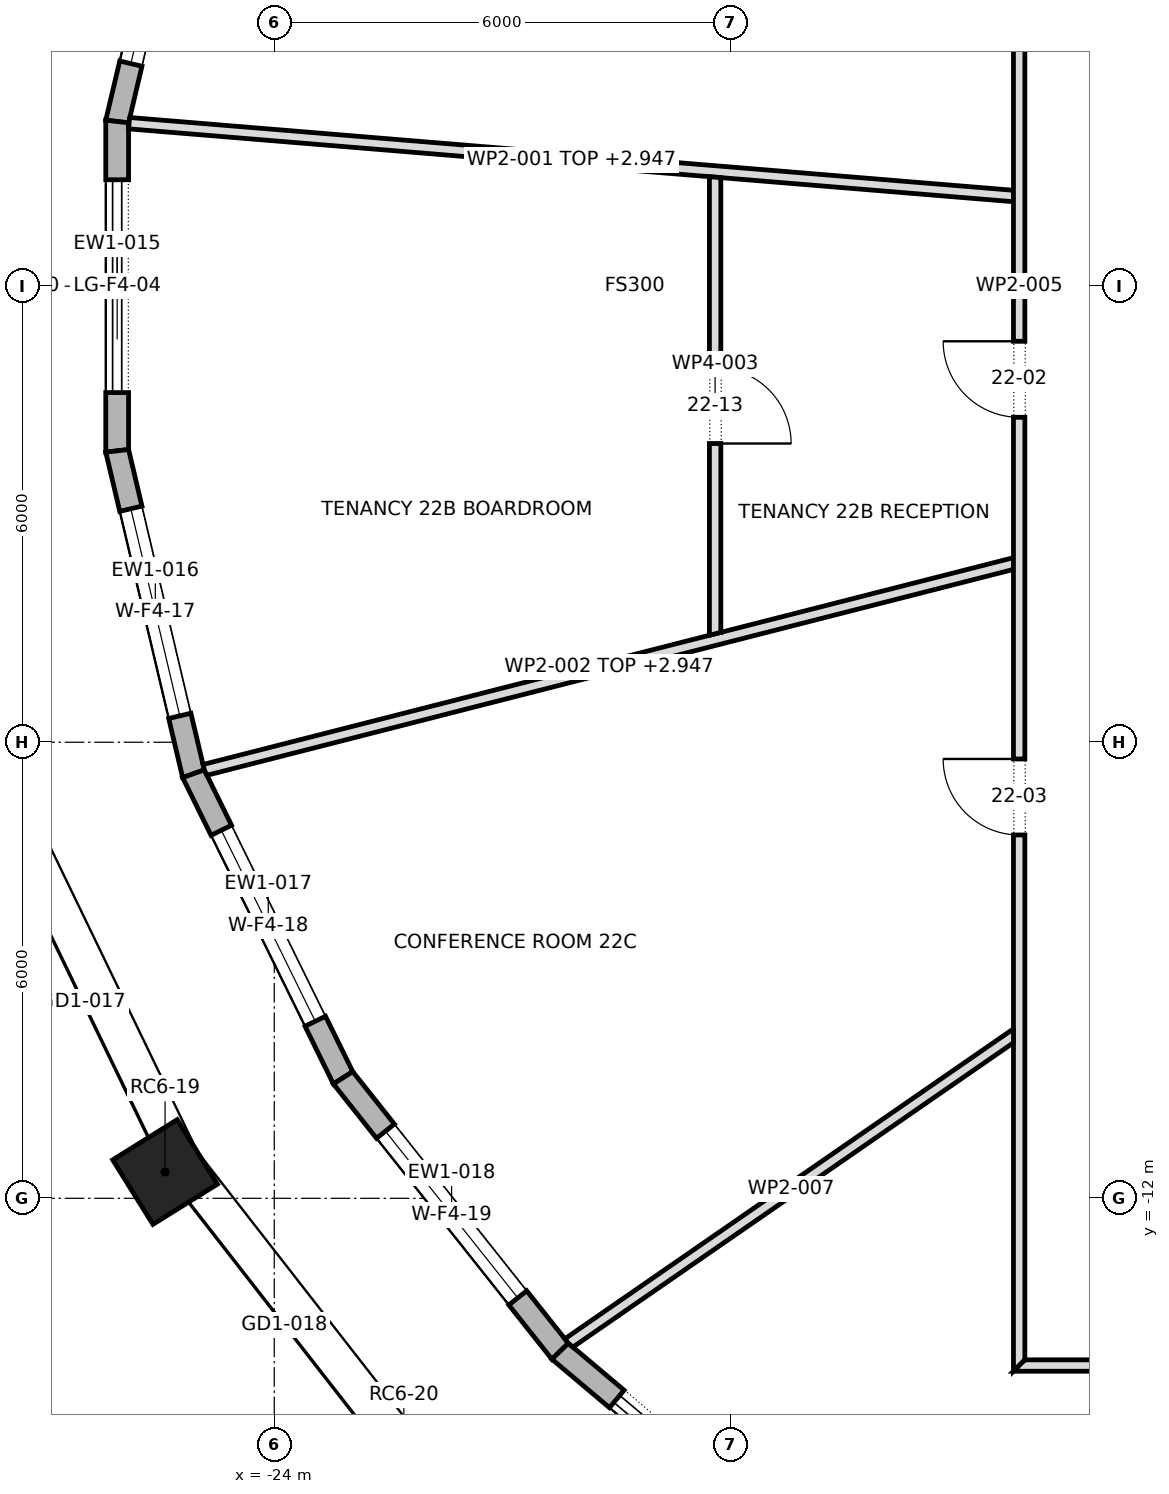
"""IFC4 building model, lengths in metres.
Left out: names, types, materials, properties, quantities, classifications, styles, units other than length and angle.
Written with IfcOpenShell. Run it as: python <this file> out.ifc"""

import sys

from ifc_helpers import new_model, si_unit, direction, frame, frame_2d, origin, origin_2d, place, context, subcontext, project, spatial, polyline, rectangle, outline, extrude, element, fill, save


model = new_model("IFC4")
c1 = context("Model", 3, precision=1e-05, world=origin(), true_north=direction((0.0, 1.0)))
c2 = subcontext(c1, "Body", "Model", "MODEL_VIEW")
j1 = project(units=[si_unit("LENGTHUNIT", "METRE"), si_unit("PLANEANGLEUNIT", "RADIAN")], contexts=[c1])
p1 = place(None, origin())
s1 = spatial("IfcSite", under=j1, at=p1, CompositionType="ELEMENT")
p2 = place(p1, origin())
s2 = spatial("IfcBuilding", under=s1, at=p2, CompositionType="ELEMENT")
p3 = place(p2, frame((0.0, 0.0, 304.3)))
s3 = spatial("IfcBuildingStorey", under=s2, at=p3, CompositionType="ELEMENT", Elevation=304.3)
p4 = place(p3, frame((-25.437, -11.654, 0.0), z_axis=(0.0, 0.0, 1.0), x_axis=(0.529150863019, -0.848527762755, 0.0)))
e1 = element("IfcColumn", 1, at=p4, inside=s3, PredefinedType="COLUMN", context=c2, shape_type="SweptSolid", body=[
    extrude(rectangle(XDim=1.0, YDim=1.0, at=origin_2d()), origin(), (0.0, 0.0, 1.0), 4.0),
])
p5 = place(p3, frame((-25.063, 6.415, 0.0), z_axis=(0.0, 0.0, 1.0), x_axis=(-0.229974411334, -0.973196675977, 0.0)))
e2 = element("IfcWall", 2, at=p5, inside=s3, PredefinedType="STANDARD", context=c2, shape_type="SweptSolid", body=[
    extrude(outline(polyline([(-0.017, -0.15), (4.383, -0.15), (4.348, 0.15), (0.017, 0.15), (-0.017, -0.15)])), origin(), (0.0, 0.0, 1.0), 3.7),
])
p6 = place(p5, frame((0.783, 0.0, 0.6)))
e3 = element("IfcOpeningElement", 3, at=p6, cuts=e2, PredefinedType="OPENING", context=c2, shape_type="SweptSolid", body=[
    extrude(rectangle(XDim=2.8, YDim=2.65, at=frame_2d((1.4, 1.325))), frame((0.0, 0.162, 0.0), z_axis=(0.0, -1.0, 0.0), x_axis=(1.0, 0.0, 0.0)), (0.0, 0.0, 1.0), 0.324),
])
p7 = place(p3, frame((-26.067, 2.166, 0.0), z_axis=(0.0, 0.0, 1.0), x_axis=(0.0, -1.0, 0.0)))
e4 = element("IfcWall", 4, at=p7, inside=s3, PredefinedType="STANDARD", context=c2, shape_type="SweptSolid", body=[
    extrude(outline(polyline([(-0.018, -0.15), (4.35, -0.15), (4.315, 0.15), (0.018, 0.15), (-0.018, -0.15)])), origin(), (0.0, 0.0, 1.0), 3.7),
])
p8 = place(p7, frame((0.766, 0.0, 0.0)))
e5 = element("IfcOpeningElement", 5, at=p8, cuts=e4, PredefinedType="OPENING", context=c2, shape_type="SweptSolid", body=[
    extrude(rectangle(XDim=2.8, YDim=3.25, at=frame_2d((1.4, 1.625))), frame((0.0, 0.162, 0.0), z_axis=(0.0, -1.0, 0.0), x_axis=(1.0, 0.0, 0.0)), (0.0, 0.0, 1.0), 0.324),
])
p9 = place(p3, frame((-26.067, -2.166, 0.0), z_axis=(0.0, 0.0, 1.0), x_axis=(0.229974411334, -0.973196675977, 0.0)))
e6 = element("IfcWall", 6, at=p9, inside=s3, PredefinedType="STANDARD", context=c2, shape_type="SweptSolid", body=[
    extrude(outline(polyline([(-0.018, -0.15), (4.382, -0.15), (4.348, 0.15), (0.018, 0.15), (-0.018, -0.15)])), origin(), (0.0, 0.0, 1.0), 3.7),
])
p10 = place(p9, frame((0.783, 0.0, 0.6)))
e7 = element("IfcOpeningElement", 7, at=p10, cuts=e6, PredefinedType="OPENING", context=c2, shape_type="SweptSolid", body=[
    extrude(rectangle(XDim=2.8, YDim=2.65, at=frame_2d((1.4, 1.325))), frame((0.0, 0.162, 0.0), z_axis=(0.0, -1.0, 0.0), x_axis=(1.0, 0.0, 0.0)), (0.0, 0.0, 1.0), 0.324),
])
p11 = place(p3, frame((-25.063, -6.415, 0.0), z_axis=(0.0, 0.0, 1.0), x_axis=(0.441509050872, -0.897256796017, 0.0)))
e8 = element("IfcWall", 8, at=p11, inside=s3, PredefinedType="STANDARD", context=c2, shape_type="SweptSolid", body=[
    extrude(outline(polyline([(-0.017, -0.15), (4.474, -0.15), (4.442, 0.15), (0.017, 0.15), (-0.017, -0.15)])), origin(), (0.0, 0.0, 1.0), 3.7),
])
p12 = place(p11, frame((0.829, 0.0, 0.6)))
e9 = element("IfcOpeningElement", 9, at=p12, cuts=e8, PredefinedType="OPENING", context=c2, shape_type="SweptSolid", body=[
    extrude(rectangle(XDim=2.8, YDim=2.65, at=frame_2d((1.4, 1.325))), frame((0.0, 0.162, 0.0), z_axis=(0.0, -1.0, 0.0), x_axis=(1.0, 0.0, 0.0)), (0.0, 0.0, 1.0), 0.324),
])
p13 = place(p3, frame((-23.094, -10.415, 0.0), z_axis=(0.0, 0.0, 1.0), x_axis=(0.621682706372, -0.78326918272, 0.0)))
e10 = element("IfcWall", 10, at=p13, inside=s3, PredefinedType="STANDARD", context=c2, shape_type="SweptSolid", body=[
    extrude(outline(polyline([(-0.016, -0.15), (4.608, -0.15), (4.578, 0.15), (0.016, 0.15), (-0.016, -0.15)])), origin(), (0.0, 0.0, 1.0), 3.7),
])
p14 = place(p13, frame((0.896, 0.0, 0.6)))
e11 = element("IfcOpeningElement", 11, at=p14, cuts=e10, PredefinedType="OPENING", context=c2, shape_type="SweptSolid", body=[
    extrude(rectangle(XDim=2.8, YDim=2.65, at=frame_2d((1.4, 1.325))), frame((0.0, 0.162, 0.0), z_axis=(0.0, -1.0, 0.0), x_axis=(1.0, 0.0, 0.0)), (0.0, 0.0, 1.0), 0.324),
])
p15 = place(p3, frame((-20.239, -14.012, 0.0), z_axis=(0.0, 0.0, 1.0), x_axis=(0.765059193792, -0.643959959931, 0.0)))
e12 = element("IfcWall", 12, at=p15, inside=s3, PredefinedType="STANDARD", context=c2, shape_type="SweptSolid", body=[
    extrude(outline(polyline([(-0.015, -0.15), (4.762, -0.15), (4.734, 0.15), (0.015, 0.15), (-0.015, -0.15)])), origin(), (0.0, 0.0, 1.0), 3.7),
])
p16 = place(p15, frame((0.974, 0.0, 0.0)))
e13 = element("IfcOpeningElement", 13, at=p16, cuts=e12, PredefinedType="OPENING", context=c2, shape_type="SweptSolid", body=[
    extrude(rectangle(XDim=2.8, YDim=3.25, at=frame_2d((1.4, 1.625))), frame((0.0, 0.162, 0.0), z_axis=(0.0, -1.0, 0.0), x_axis=(1.0, 0.0, 0.0)), (0.0, 0.0, 1.0), 0.324),
])
p17 = place(p3, frame((-25.91, 2.145, 0.0), z_axis=(0.0, 0.0, 1.0), x_axis=(0.996625584757, -0.082081933503, 0.0)))
e14 = element("IfcWall", 14, at=p17, inside=s3, PredefinedType="PARTITIONING", context=c2, shape_type="SweptSolid", body=[
    extrude(outline(polyline([(11.68, -0.075), (11.68, -0.068), (11.668, 0.075), (9.724, 0.075), (7.78, 0.075), (5.836, 0.075), (3.892, 0.075), (1.948, 0.075), (0.004, 0.075), (0.0, 0.049), (0.0, -0.075), (1.947, -0.075), (3.893, -0.075), (5.84, -0.075), (7.787, -0.075), (9.733, -0.075), (11.68, -0.075)])), origin(), (0.0, 0.0, 1.0), 2.947),
])
p18 = place(p3, frame((-24.919, -6.365, 0.0), z_axis=(0.0, 0.0, 1.0), x_axis=(0.968945878768, 0.247272893819, 0.0)))
e15 = element("IfcWall", 15, at=p18, inside=s3, PredefinedType="PARTITIONING", context=c2, shape_type="SweptSolid", body=[
    extrude(outline(polyline([(0.015, -0.075), (1.84, -0.075), (3.665, -0.075), (5.49, -0.075), (7.315, -0.075), (9.141, -0.075), (10.966, -0.075), (11.004, 0.075), (11.004, 0.075), (9.017, 0.075), (7.031, 0.075), (7.031, 0.074), (7.028, 0.075), (5.271, 0.075), (3.514, 0.075), (1.757, 0.075), (0.0, 0.075), (0.0, -0.005), (0.015, -0.075)])), origin(), (0.0, 0.0, 1.0), 2.947),
])
p19 = place(p3, frame((-18.2, -4.593, 0.0), z_axis=(0.0, 0.0, 1.0), x_axis=(0.0, 1.0, 0.0)))
e16 = element("IfcWall", 16, at=p19, inside=s3, PredefinedType="PARTITIONING", context=c2, shape_type="SweptSolid", body=[
    extrude(outline(polyline([(0.038, -0.075), (2.032, -0.075), (4.026, -0.075), (6.021, -0.075), (6.032, 0.07), (6.032, 0.075), (4.524, 0.075), (3.016, 0.075), (1.508, 0.075), (0.0, 0.075), (0.0, 0.075), (0.038, -0.075)])), origin(), (0.0, 0.0, 1.0), 3.7),
])
p20 = place(p19, frame((2.522, 0.0, 0.0)))
e17 = element("IfcOpeningElement", 17, at=p20, cuts=e16, PredefinedType="OPENING", context=c2, shape_type="SweptSolid", body=[
    extrude(rectangle(XDim=1.0, YDim=2.1, at=frame_2d((0.5, 1.05))), frame((0.0, 0.087, 0.0), z_axis=(0.0, -1.0, 0.0), x_axis=(1.0, 0.0, 0.0)), (0.0, 0.0, 1.0), 0.174),
])
p21 = place(p3, frame((-14.2, -14.275, 0.0), z_axis=(0.0, 0.0, 1.0), x_axis=(0.0, 1.0, 0.0)))
e18 = element("IfcWall", 18, at=p21, inside=s3, PredefinedType="PARTITIONING", context=c2, shape_type="SweptSolid", body=[
    extrude(outline(polyline([(0.15, -0.075), (2.033, -0.075), (3.917, -0.075), (5.8, -0.075), (7.683, -0.075), (9.567, -0.075), (11.45, -0.075), (13.333, -0.075), (15.217, -0.075), (17.1, -0.075), (18.983, -0.075), (20.866, -0.075), (22.75, -0.075), (24.633, -0.075), (26.517, -0.075), (28.4, -0.075), (28.55, 0.075), (28.55, 0.075), (26.646, 0.075), (24.743, 0.075), (22.84, 0.075), (20.937, 0.075), (19.033, 0.075), (17.13, 0.075), (15.227, 0.075), (13.323, 0.075), (11.42, 0.075), (9.517, 0.075), (7.613, 0.075), (5.71, 0.075), (3.807, 0.075), (1.903, 0.075), (0.0, 0.075), (0.15, -0.075)])), origin(), (0.0, 0.0, 1.0), 3.7),
])
p22 = place(p21, frame((21.465, 0.0, 0.0)))
e19 = element("IfcOpeningElement", 19, at=p22, cuts=e18, PredefinedType="OPENING", context=c2, shape_type="SweptSolid", body=[
    extrude(rectangle(XDim=1.0, YDim=2.1, at=frame_2d((0.5, 1.05))), frame((0.0, 0.087, 0.0), z_axis=(0.0, -1.0, 0.0), x_axis=(1.0, 0.0, 0.0)), (0.0, 0.0, 1.0), 0.174),
])
p23 = place(p21, frame((12.55, 0.0, 0.0)))
e20 = element("IfcOpeningElement", 20, at=p23, cuts=e18, PredefinedType="OPENING", context=c2, shape_type="SweptSolid", body=[
    extrude(rectangle(XDim=1.0, YDim=2.1, at=frame_2d((0.5, 1.05))), frame((0.0, 0.087, 0.0), z_axis=(0.0, -1.0, 0.0), x_axis=(1.0, 0.0, 0.0)), (0.0, 0.0, 1.0), 0.174),
])
p24 = place(p21, frame((7.055, 0.0, 0.0)))
e21 = element("IfcOpeningElement", 21, at=p24, cuts=e18, PredefinedType="OPENING", context=c2, shape_type="SweptSolid", body=[
    extrude(rectangle(XDim=1.0, YDim=2.1, at=frame_2d((0.5, 1.05))), frame((0.0, 0.087, 0.0), z_axis=(0.0, -1.0, 0.0), x_axis=(1.0, 0.0, 0.0)), (0.0, 0.0, 1.0), 0.174),
])
p25 = place(p3, frame((-14.275, -14.2, 0.0), z_axis=(0.0, 0.0, 1.0), x_axis=(1.0, 0.0, 0.0)))
e22 = element("IfcWall", 22, at=p25, inside=s3, PredefinedType="PARTITIONING", context=c2, shape_type="SweptSolid", body=[
    extrude(outline(polyline([(28.55, -0.075), (28.55, -0.075), (28.4, 0.075), (26.517, 0.075), (24.633, 0.075), (22.75, 0.075), (20.866, 0.075), (18.983, 0.075), (17.1, 0.075), (15.217, 0.075), (13.333, 0.075), (11.45, 0.075), (9.567, 0.075), (7.683, 0.075), (5.8, 0.075), (3.917, 0.075), (2.033, 0.075), (0.15, 0.075), (0.0, -0.075), (1.903, -0.075), (3.807, -0.075), (5.71, -0.075), (7.613, -0.075), (9.517, -0.075), (11.42, -0.075), (13.323, -0.075), (15.227, -0.075), (17.13, -0.075), (19.033, -0.075), (20.937, -0.075), (22.84, -0.075), (24.743, -0.075), (26.646, -0.075), (28.55, -0.075)])), origin(), (0.0, 0.0, 1.0), 3.7),
])
p26 = place(p25, frame((2.165, 0.0, 0.0)))
e23 = element("IfcOpeningElement", 23, at=p26, cuts=e22, PredefinedType="OPENING", context=c2, shape_type="SweptSolid", body=[
    extrude(rectangle(XDim=1.0, YDim=2.1, at=frame_2d((0.5, 1.05))), frame((0.0, 0.087, 0.0), z_axis=(0.0, -1.0, 0.0), x_axis=(1.0, 0.0, 0.0)), (0.0, 0.0, 1.0), 0.174),
])
p27 = place(p25, frame((11.825, 0.0, 0.0)))
e24 = element("IfcOpeningElement", 24, at=p27, cuts=e22, PredefinedType="OPENING", context=c2, shape_type="SweptSolid", body=[
    extrude(rectangle(XDim=1.0, YDim=2.1, at=frame_2d((0.5, 1.05))), frame((0.0, 0.087, 0.0), z_axis=(0.0, -1.0, 0.0), x_axis=(1.0, 0.0, 0.0)), (0.0, 0.0, 1.0), 0.174),
])
p28 = place(p25, frame((23.255, 0.0, 0.0)))
e25 = element("IfcOpeningElement", 25, at=p28, cuts=e22, PredefinedType="OPENING", context=c2, shape_type="SweptSolid", body=[
    extrude(rectangle(XDim=1.0, YDim=2.1, at=frame_2d((0.5, 1.05))), frame((0.0, 0.087, 0.0), z_axis=(0.0, -1.0, 0.0), x_axis=(1.0, 0.0, 0.0)), (0.0, 0.0, 1.0), 0.174),
])
p29 = place(p3, frame((-14.232, -9.833, 0.0), z_axis=(0.0, 0.0, 1.0), x_axis=(-0.822725997435, -0.568438152436, 0.0)))
e26 = element("IfcWall", 26, at=p29, inside=s3, PredefinedType="PARTITIONING", context=c2, shape_type="SweptSolid", body=[
    extrude(outline(polyline([(0.0, -0.075), (1.793, -0.075), (3.587, -0.075), (5.38, -0.075), (7.174, -0.075), (7.169, -0.001), (7.148, 0.075), (5.387, 0.075), (3.626, 0.075), (1.865, 0.075), (0.104, 0.075), (0.0, -0.075), (0.0, -0.075)])), origin(), (0.0, 0.0, 1.0), 3.7),
])
p30 = place(p6, origin())
e27 = element("IfcWindow", 27, at=p30, inside=s3, PartitioningType="DOUBLE_PANEL_VERTICAL", PredefinedType="WINDOW", context=c2, shape_type="SweptSolid", body=[
    extrude(rectangle(XDim=2.8, YDim=2.65, at=frame_2d((1.4, 1.325))), frame((0.0, 0.03, 0.0), z_axis=(0.0, -1.0, 0.0), x_axis=(1.0, 0.0, 0.0)), (0.0, 0.0, 1.0), 0.06),
])
fill(e3, e27)
p31 = place(p8, origin())
e28 = element("IfcDoor", 28, at=p31, inside=s3, OperationType="DOUBLE_DOOR_SLIDING", PredefinedType="DOOR", context=c2, shape_type="SweptSolid", body=[
    extrude(rectangle(XDim=2.8, YDim=3.25, at=frame_2d((1.4, 1.625))), frame((0.0, 0.025, 0.0), z_axis=(0.0, -1.0, 0.0), x_axis=(1.0, 0.0, 0.0)), (0.0, 0.0, 1.0), 0.05),
])
fill(e5, e28)
p32 = place(p10, origin())
e29 = element("IfcWindow", 29, at=p32, inside=s3, PartitioningType="DOUBLE_PANEL_VERTICAL", PredefinedType="WINDOW", context=c2, shape_type="SweptSolid", body=[
    extrude(rectangle(XDim=2.8, YDim=2.65, at=frame_2d((1.4, 1.325))), frame((0.0, 0.03, 0.0), z_axis=(0.0, -1.0, 0.0), x_axis=(1.0, 0.0, 0.0)), (0.0, 0.0, 1.0), 0.06),
])
fill(e7, e29)
p33 = place(p12, origin())
e30 = element("IfcWindow", 30, at=p33, inside=s3, PartitioningType="DOUBLE_PANEL_VERTICAL", PredefinedType="WINDOW", context=c2, shape_type="SweptSolid", body=[
    extrude(rectangle(XDim=2.8, YDim=2.65, at=frame_2d((1.4, 1.325))), frame((0.0, 0.03, 0.0), z_axis=(0.0, -1.0, 0.0), x_axis=(1.0, 0.0, 0.0)), (0.0, 0.0, 1.0), 0.06),
])
fill(e9, e30)
p34 = place(p14, origin())
e31 = element("IfcWindow", 31, at=p34, inside=s3, PartitioningType="DOUBLE_PANEL_VERTICAL", PredefinedType="WINDOW", context=c2, shape_type="SweptSolid", body=[
    extrude(rectangle(XDim=2.8, YDim=2.65, at=frame_2d((1.4, 1.325))), frame((0.0, 0.03, 0.0), z_axis=(0.0, -1.0, 0.0), x_axis=(1.0, 0.0, 0.0)), (0.0, 0.0, 1.0), 0.06),
])
fill(e11, e31)
p35 = place(p16, origin())
e32 = element("IfcDoor", 32, at=p35, inside=s3, OperationType="DOUBLE_DOOR_SLIDING", PredefinedType="DOOR", context=c2, shape_type="SweptSolid", body=[
    extrude(rectangle(XDim=2.8, YDim=3.25, at=frame_2d((1.4, 1.625))), frame((0.0, 0.025, 0.0), z_axis=(0.0, -1.0, 0.0), x_axis=(1.0, 0.0, 0.0)), (0.0, 0.0, 1.0), 0.05),
])
fill(e13, e32)
p36 = place(p23, origin())
e33 = element("IfcDoor", 33, at=p36, inside=s3, OperationType="SINGLE_SWING_LEFT", PredefinedType="DOOR", context=c2, shape_type="SweptSolid", body=[
    extrude(rectangle(XDim=1.0, YDim=2.1, at=frame_2d((0.5, 1.05))), frame((0.0, 0.025, 0.0), z_axis=(0.0, -1.0, 0.0), x_axis=(1.0, 0.0, 0.0)), (0.0, 0.0, 1.0), 0.05),
])
fill(e20, e33)
p37 = place(p24, origin())
e34 = element("IfcDoor", 34, at=p37, inside=s3, OperationType="SINGLE_SWING_LEFT", PredefinedType="DOOR", context=c2, shape_type="SweptSolid", body=[
    extrude(rectangle(XDim=1.0, YDim=2.1, at=frame_2d((0.5, 1.05))), frame((0.0, 0.025, 0.0), z_axis=(0.0, -1.0, 0.0), x_axis=(1.0, 0.0, 0.0)), (0.0, 0.0, 1.0), 0.05),
])
fill(e21, e34)
p38 = place(p20, frame((1.0, 0.0, 0.0), z_axis=(0.0, 0.0, 1.0), x_axis=(-1.0, 0.0, 0.0)))
e35 = element("IfcDoor", 35, at=p38, inside=s3, OperationType="SINGLE_SWING_LEFT", PredefinedType="DOOR", context=c2, shape_type="SweptSolid", body=[
    extrude(rectangle(XDim=1.0, YDim=2.1, at=frame_2d((0.5, 1.05))), frame((0.0, 0.025, 0.0), z_axis=(0.0, -1.0, 0.0), x_axis=(1.0, 0.0, 0.0)), (0.0, 0.0, 1.0), 0.05),
])
fill(e17, e35)
save(model, sys.argv[1])
